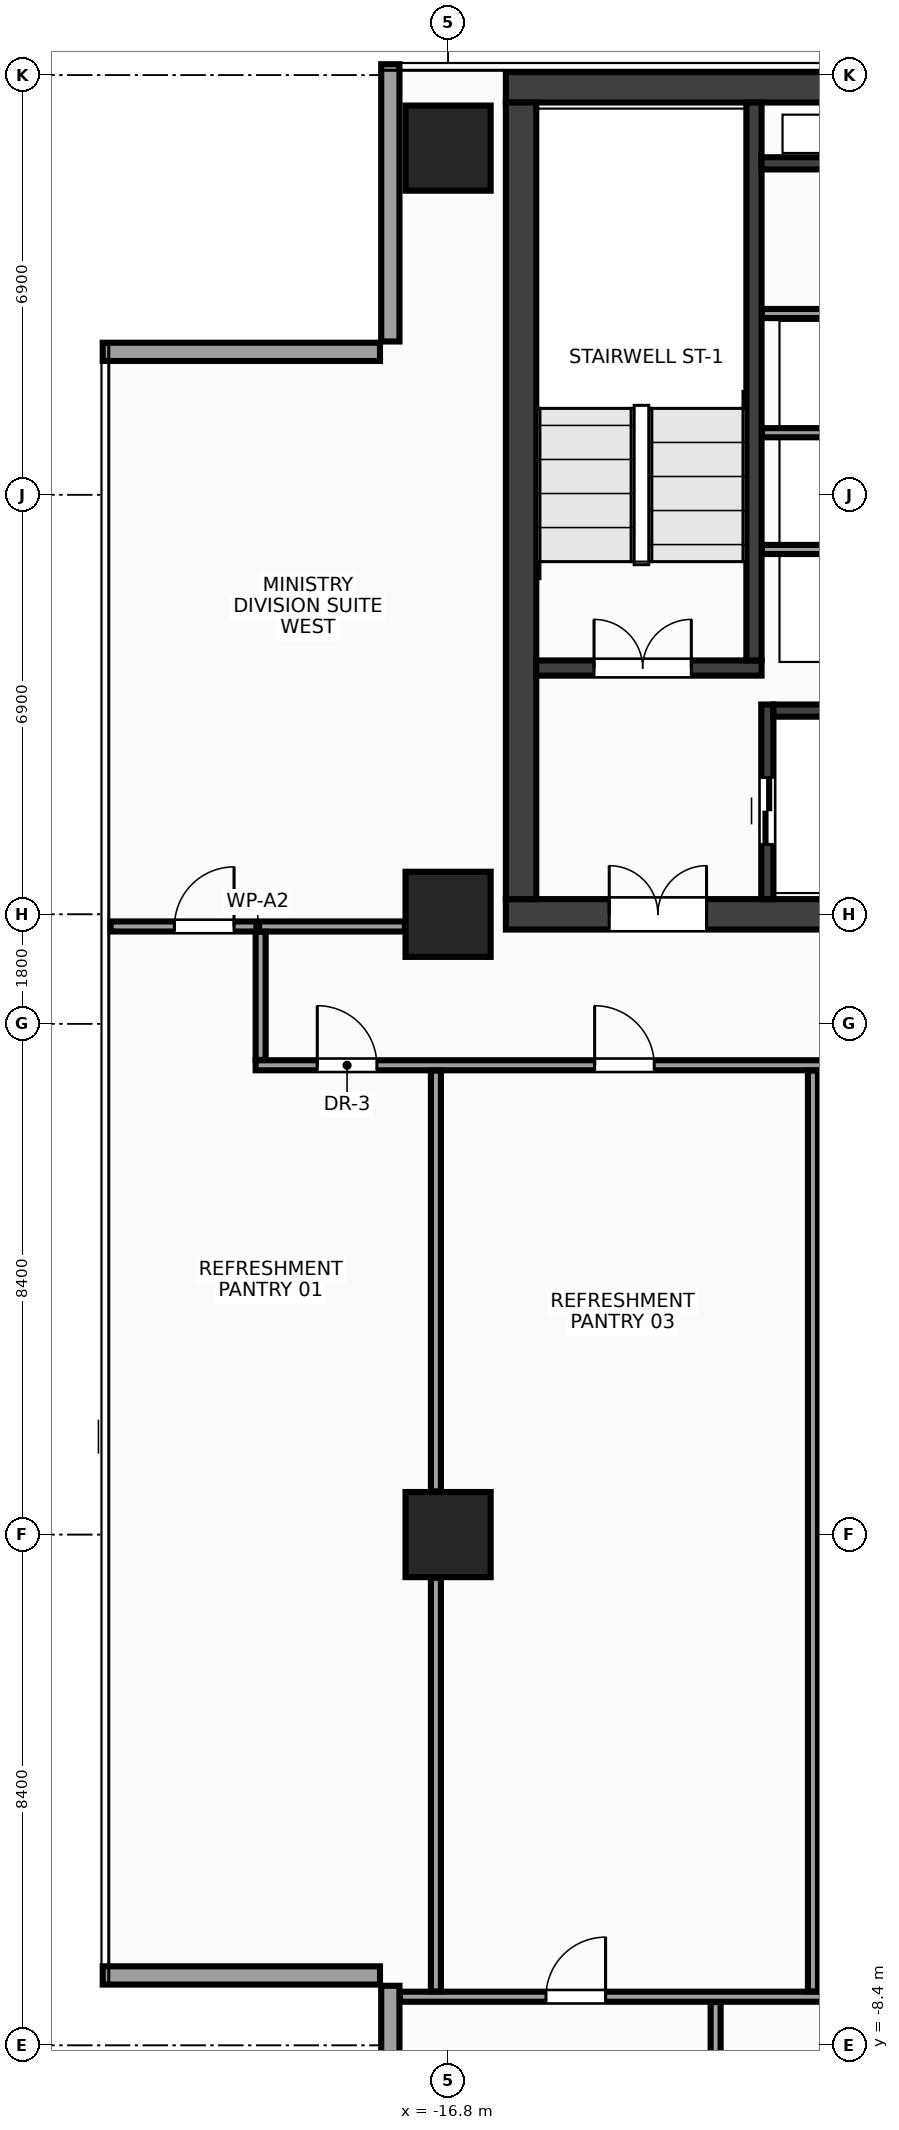
"""IFC4 building model, lengths in metres.
Left out: names, types, materials, properties, quantities, classifications, styles, units other than length and angle.
Written with IfcOpenShell. Run it as: python <this file> out.ifc"""

import sys

from ifc_helpers import new_model, si_unit, direction, frame, frame_2d, origin, origin_2d, place, context, subcontext, project, spatial, rectangle, extrude, source, transform, mapped, element, fill, save


model = new_model("IFC4")
c1 = context("Model", 3, precision=1e-05, world=origin(), true_north=direction((0.0, 1.0)))
c2 = subcontext(c1, "Body", "Model", "MODEL_VIEW")
j1 = project(units=[si_unit("LENGTHUNIT", "METRE"), si_unit("PLANEANGLEUNIT", "RADIAN")], contexts=[c1])
p1 = place(None, origin())
s1 = spatial("IfcSite", under=j1, at=p1, CompositionType="ELEMENT")
p2 = place(p1, origin())
s2 = spatial("IfcBuilding", under=s1, at=p2, CompositionType="ELEMENT")
p3 = place(p2, frame((0.0, 0.0, 254.0)))
s3 = spatial("IfcBuildingStorey", under=s2, at=p3, CompositionType="ELEMENT", Elevation=254.0)
m1 = source(origin(), c2, "Body", "SweptSolid", [
    extrude(rectangle(XDim=31.7, YDim=0.5, at=frame_2d((15.85, 0.0))), origin(), (0.0, 0.0, 1.0), 3.6),
])
p4 = place(p3, frame((-15.85, 23.8, 0.0), z_axis=(0.0, 0.0, 1.0), x_axis=(1.0, 0.0, 0.0)))
e1 = element("IfcWall", 1, at=p4, inside=s3, PredefinedType="SHEAR", context=c2, shape_type="MappedRepresentation", body=[
    mapped(m1, transform((0.0, 0.0, 0.0), x_axis=(1.0, 0.0, 0.0), y_axis=(0.0, 1.0, 0.0), z_axis=(0.0, 0.0, 1.0), scale=1.0)),
])
p5 = place(p3, frame((-15.85, 10.2, 0.0), z_axis=(0.0, 0.0, 1.0), x_axis=(1.0, 0.0, 0.0)))
e2 = element("IfcWall", 2, at=p5, inside=s3, PredefinedType="SHEAR", context=c2, shape_type="MappedRepresentation", body=[
    mapped(m1, transform((0.0, 0.0, 0.0), x_axis=(1.0, 0.0, 0.0), y_axis=(0.0, 1.0, 0.0), z_axis=(0.0, 0.0, 1.0), scale=1.0)),
])
p6 = place(p5, frame((1.7, 0.0, 0.0)))
e3 = element("IfcOpeningElement", 3, at=p6, cuts=e2, PredefinedType="OPENING", context=c2, shape_type="SweptSolid", body=[
    extrude(rectangle(XDim=1.6, YDim=2.15, at=frame_2d((0.8, 1.075))), frame((0.0, 0.262, 0.0), z_axis=(0.0, -1.0, 0.0), x_axis=(1.0, 0.0, 0.0)), (0.0, 0.0, 1.0), 0.524),
])
p7 = place(p5, frame((28.4, 0.0, 0.0)))
e4 = element("IfcOpeningElement", 4, at=p7, cuts=e2, PredefinedType="OPENING", context=c2, shape_type="SweptSolid", body=[
    extrude(rectangle(XDim=1.6, YDim=2.15, at=frame_2d((0.8, 1.075))), frame((0.0, 0.262, 0.0), z_axis=(0.0, -1.0, 0.0), x_axis=(1.0, 0.0, 0.0)), (0.0, 0.0, 1.0), 0.524),
])
p8 = place(p5, frame((15.1, 0.0, 0.0)))
e5 = element("IfcOpeningElement", 5, at=p8, cuts=e2, PredefinedType="OPENING", context=c2, shape_type="SweptSolid", body=[
    extrude(rectangle(XDim=1.5, YDim=2.2, at=frame_2d((0.75, 1.1))), frame((0.0, 0.262, 0.0), z_axis=(0.0, -1.0, 0.0), x_axis=(1.0, 0.0, 0.0)), (0.0, 0.0, 1.0), 0.524),
])
m2 = source(origin(), c2, "Body", "SweptSolid", [
    extrude(rectangle(XDim=13.1, YDim=0.5, at=frame_2d((6.55, 0.0))), origin(), (0.0, 0.0, 1.0), 3.6),
])
p9 = place(p3, frame((-15.6, 10.45, 0.0), z_axis=(0.0, 0.0, 1.0), x_axis=(0.0, 1.0, 0.0)))
e6 = element("IfcWall", 6, at=p9, inside=s3, PredefinedType="SHEAR", context=c2, shape_type="MappedRepresentation", body=[
    mapped(m2, transform((0.0, 0.0, 0.0), x_axis=(1.0, 0.0, 0.0), y_axis=(0.0, 1.0, 0.0), z_axis=(0.0, 0.0, 1.0), scale=1.0)),
])
m3 = source(origin(), c2, "Body", "SweptSolid", [
    extrude(rectangle(XDim=3.705, YDim=0.25, at=frame_2d((1.853, 0.0))), origin(), (0.0, 0.0, 1.0), 3.6),
])
p10 = place(p3, frame((-15.35, 14.25, 0.0), z_axis=(0.0, 0.0, 1.0), x_axis=(1.0, 0.0, 0.0)))
e7 = element("IfcWall", 7, at=p10, inside=s3, PredefinedType="SHEAR", context=c2, shape_type="MappedRepresentation", body=[
    mapped(m3, transform((0.0, 0.0, 0.0), x_axis=(1.0, 0.0, 0.0), y_axis=(0.0, 1.0, 0.0), z_axis=(0.0, 0.0, 1.0), scale=1.0)),
])
p11 = place(p10, frame((0.95, 0.0, 0.0)))
e8 = element("IfcOpeningElement", 8, at=p11, cuts=e7, PredefinedType="OPENING", context=c2, shape_type="SweptSolid", body=[
    extrude(rectangle(XDim=1.6, YDim=2.15, at=frame_2d((0.8, 1.075))), frame((0.0, 0.137, 0.0), z_axis=(0.0, -1.0, 0.0), x_axis=(1.0, 0.0, 0.0)), (0.0, 0.0, 1.0), 0.274),
])
m4 = source(origin(), c2, "Body", "SweptSolid", [
    extrude(rectangle(XDim=9.175, YDim=0.25, at=frame_2d((4.587, 0.0))), origin(), (0.0, 0.0, 1.0), 3.6),
])
p12 = place(p3, frame((-11.77, 14.375, 0.0), z_axis=(0.0, 0.0, 1.0), x_axis=(0.0, 1.0, 0.0)))
e9 = element("IfcWall", 9, at=p12, inside=s3, PredefinedType="SHEAR", context=c2, shape_type="MappedRepresentation", body=[
    mapped(m4, transform((0.0, 0.0, 0.0), x_axis=(1.0, 0.0, 0.0), y_axis=(0.0, 1.0, 0.0), z_axis=(0.0, 0.0, 1.0), scale=1.0)),
])
m5 = source(origin(), c2, "Body", "SweptSolid", [
    extrude(rectangle(XDim=3.2, YDim=0.2, at=frame_2d((1.6, 0.0))), origin(), (0.0, 0.0, 1.0), 3.6),
])
p13 = place(p3, frame((-11.55, 10.45, 0.0), z_axis=(0.0, 0.0, 1.0), x_axis=(0.0, 1.0, 0.0)))
e10 = element("IfcWall", 10, at=p13, inside=s3, PredefinedType="SHEAR", context=c2, shape_type="MappedRepresentation", body=[
    mapped(m5, transform((0.0, 0.0, 0.0), x_axis=(1.0, 0.0, 0.0), y_axis=(0.0, 1.0, 0.0), z_axis=(0.0, 0.0, 1.0), scale=1.0)),
])
p14 = place(p13, frame((0.9, 0.0, 0.0)))
e11 = element("IfcOpeningElement", 11, at=p14, cuts=e10, PredefinedType="OPENING", context=c2, shape_type="SweptSolid", body=[
    extrude(rectangle(XDim=1.1, YDim=2.15, at=frame_2d((0.55, 1.075))), frame((0.0, 0.112, 0.0), z_axis=(0.0, -1.0, 0.0), x_axis=(1.0, 0.0, 0.0)), (0.0, 0.0, 1.0), 0.224),
])
m6 = source(origin(), c2, "Body", "SweptSolid", [
    extrude(rectangle(XDim=2.825, YDim=0.2, at=frame_2d((1.413, 0.0))), origin(), (0.0, 0.0, 1.0), 3.6),
])
p15 = place(p3, frame((-11.45, 13.55, 0.0), z_axis=(0.0, 0.0, 1.0), x_axis=(1.0, 0.0, 0.0)))
e12 = element("IfcWall", 12, at=p15, inside=s3, PredefinedType="SHEAR", context=c2, shape_type="MappedRepresentation", body=[
    mapped(m6, transform((0.0, 0.0, 0.0), x_axis=(1.0, 0.0, 0.0), y_axis=(0.0, 1.0, 0.0), z_axis=(0.0, 0.0, 1.0), scale=1.0)),
])
m7 = source(origin(), c2, "Body", "SweptSolid", [
    extrude(rectangle(XDim=3.02, YDim=0.2, at=frame_2d((1.51, 0.0))), origin(), (0.0, 0.0, 1.0), 3.6),
])
p16 = place(p3, frame((-11.645, 22.55, 0.0), z_axis=(0.0, 0.0, 1.0), x_axis=(1.0, 0.0, 0.0)))
e13 = element("IfcWall", 13, at=p16, inside=s3, PredefinedType="SHEAR", context=c2, shape_type="MappedRepresentation", body=[
    mapped(m7, transform((0.0, 0.0, 0.0), x_axis=(1.0, 0.0, 0.0), y_axis=(0.0, 1.0, 0.0), z_axis=(0.0, 0.0, 1.0), scale=1.0)),
])
m8 = source(origin(), c2, "Body", "SweptSolid", [
    extrude(rectangle(XDim=1.4, YDim=1.4, at=origin_2d()), origin(), (0.0, 0.0, 1.0), 3.6),
])
for number, where, z_axis, x_axis in (
    (14, (-16.8, 0.0, 0.0), (0.0, 0.0, 1.0), (1.0, 0.0, 0.0)),
    (15, (-16.8, 10.2, 0.0), (0.0, 0.0, 1.0), (1.0, 0.0, 0.0)),
    (16, (-16.8, 22.8, 0.0), (0.0, 0.0, 1.0), (1.0, 0.0, 0.0)),
):
    element("IfcColumn", number, at=place(p3, frame(where, z_axis=z_axis, x_axis=x_axis)), inside=s3, PredefinedType="COLUMN", context=c2, shape_type="MappedRepresentation", body=[
        mapped(m8, transform((0.0, 0.0, 0.0), x_axis=(1.0, 0.0, 0.0), y_axis=(0.0, 1.0, 0.0), z_axis=(0.0, 0.0, 1.0), scale=1.0)),
    ])
m9 = source(origin(), c2, "Body", "SweptSolid", [
    extrude(rectangle(XDim=4.56, YDim=0.3, at=frame_2d((2.28, 0.0))), origin(), (0.0, 0.0, 1.0), 2.75),
])
p17 = place(p3, frame((-17.75, 24.18, 0.0), z_axis=(0.0, 0.0, 1.0), x_axis=(0.0, -1.0, 0.0)))
e17 = element("IfcWall", 17, at=p17, inside=s3, PredefinedType="STANDARD", context=c2, shape_type="MappedRepresentation", body=[
    mapped(m9, transform((0.0, 0.0, 0.0), x_axis=(1.0, 0.0, 0.0), y_axis=(0.0, 1.0, 0.0), z_axis=(0.0, 0.0, 1.0), scale=1.0)),
])
m10 = source(origin(), c2, "Body", "SweptSolid", [
    extrude(rectangle(XDim=4.56, YDim=0.3, at=frame_2d((2.28, 0.0))), origin(), (0.0, 0.0, 1.0), 2.75),
])
for number, where, z_axis, x_axis in (
    (18, (-17.92, 19.45, 0.0), (0.0, 0.0, 1.0), (-1.0, 0.0, 0.0)),
    (19, (-22.48, -7.25, 0.0), (0.0, 0.0, 1.0), (1.0, 0.0, 0.0)),
    (20, (-17.75, -7.42, 0.0), (0.0, 0.0, 1.0), (0.0, -1.0, 0.0)),
):
    element("IfcWall", number, at=place(p3, frame(where, z_axis=z_axis, x_axis=x_axis)), inside=s3, PredefinedType="STANDARD", context=c2, shape_type="MappedRepresentation", body=[
        mapped(m10, transform((0.0, 0.0, 0.0), x_axis=(1.0, 0.0, 0.0), y_axis=(0.0, 1.0, 0.0), z_axis=(0.0, 0.0, 1.0), scale=1.0)),
    ])
m11 = source(origin(), c2, "Body", "SweptSolid", [
    extrude(rectangle(XDim=3.01, YDim=0.15, at=frame_2d((1.505, 0.0))), origin(), (0.0, 0.0, 1.0), 3.37),
])
for number, where, z_axis, x_axis in (
    (21, (-11.64, 16.2, 0.0), (0.0, 0.0, 1.0), (1.0, 0.0, 0.0)),
    (22, (-11.64, 18.12, 0.0), (0.0, 0.0, 1.0), (1.0, 0.0, 0.0)),
    (23, (-11.64, 20.08, 0.0), (0.0, 0.0, 1.0), (1.0, 0.0, 0.0)),
):
    element("IfcWall", number, at=place(p3, frame(where, z_axis=z_axis, x_axis=x_axis)), inside=s3, PredefinedType="PARTITIONING", context=c2, shape_type="MappedRepresentation", body=[
        mapped(m11, transform((0.0, 0.0, 0.0), x_axis=(1.0, 0.0, 0.0), y_axis=(0.0, 1.0, 0.0), z_axis=(0.0, 0.0, 1.0), scale=1.0)),
    ])
m12 = source(origin(), c2, "Body", "SweptSolid", [
    extrude(rectangle(XDim=4.84, YDim=0.165, at=frame_2d((2.42, 0.0))), origin(), (0.0, 0.0, 1.0), 3.37),
])
p18 = place(p3, frame((-22.35, 10.0, 0.0), z_axis=(0.0, 0.0, 1.0), x_axis=(1.0, 0.0, 0.0)))
e24 = element("IfcWall", 24, at=p18, inside=s3, PredefinedType="PARTITIONING", context=c2, shape_type="MappedRepresentation", body=[
    mapped(m12, transform((0.0, 0.0, 0.0), x_axis=(1.0, 0.0, 0.0), y_axis=(0.0, 1.0, 0.0), z_axis=(0.0, 0.0, 1.0), scale=1.0)),
])
p19 = place(p18, frame((1.05, 0.0, 0.0)))
e25 = element("IfcOpeningElement", 25, at=p19, cuts=e24, PredefinedType="OPENING", context=c2, shape_type="SweptSolid", body=[
    extrude(rectangle(XDim=0.98, YDim=2.15, at=frame_2d((0.49, 1.075))), frame((0.0, 0.094, 0.0), z_axis=(0.0, -1.0, 0.0), x_axis=(1.0, 0.0, 0.0)), (0.0, 0.0, 1.0), 0.189),
])
m13 = source(origin(), c2, "Body", "SweptSolid", [
    extrude(rectangle(XDim=15.6, YDim=0.165, at=frame_2d((7.8, 0.0))), origin(), (0.0, 0.0, 1.0), 2.755),
])
p20 = place(p3, frame((-19.965, 7.718, 0.0), z_axis=(0.0, 0.0, 1.0), x_axis=(1.0, 0.0, 0.0)))
e26 = element("IfcWall", 26, at=p20, inside=s3, PredefinedType="PARTITIONING", context=c2, shape_type="MappedRepresentation", body=[
    mapped(m13, transform((0.0, 0.0, 0.0), x_axis=(1.0, 0.0, 0.0), y_axis=(0.0, 1.0, 0.0), z_axis=(0.0, 0.0, 1.0), scale=1.0)),
])
p21 = place(p20, frame((1.014, 0.0, 0.0)))
e27 = element("IfcOpeningElement", 27, at=p21, cuts=e26, PredefinedType="OPENING", context=c2, shape_type="SweptSolid", body=[
    extrude(rectangle(XDim=0.98, YDim=2.15, at=frame_2d((0.49, 1.075))), frame((0.0, 0.094, 0.0), z_axis=(0.0, -1.0, 0.0), x_axis=(1.0, 0.0, 0.0)), (0.0, 0.0, 1.0), 0.189),
])
p22 = place(p20, frame((5.575, 0.0, 0.0)))
e28 = element("IfcOpeningElement", 28, at=p22, cuts=e26, PredefinedType="OPENING", context=c2, shape_type="SweptSolid", body=[
    extrude(rectangle(XDim=0.98, YDim=2.15, at=frame_2d((0.49, 1.075))), frame((0.0, 0.094, 0.0), z_axis=(0.0, -1.0, 0.0), x_axis=(1.0, 0.0, 0.0)), (0.0, 0.0, 1.0), 0.189),
])
p23 = place(p20, frame((11.874, 0.0, 0.0)))
e29 = element("IfcOpeningElement", 29, at=p23, cuts=e26, PredefinedType="OPENING", context=c2, shape_type="SweptSolid", body=[
    extrude(rectangle(XDim=0.98, YDim=2.15, at=frame_2d((0.49, 1.075))), frame((0.0, 0.094, 0.0), z_axis=(0.0, -1.0, 0.0), x_axis=(1.0, 0.0, 0.0)), (0.0, 0.0, 1.0), 0.189),
])
m14 = source(origin(), c2, "Body", "SweptSolid", [
    extrude(rectangle(XDim=2.108, YDim=0.165, at=frame_2d((1.054, 0.0))), origin(), (0.0, 0.0, 1.0), 3.37),
])
p24 = place(p3, frame((-19.883, 7.805, 0.0), z_axis=(0.0, 0.0, 1.0), x_axis=(0.0, 1.0, 0.0)))
e30 = element("IfcWall", 30, at=p24, inside=s3, PredefinedType="PARTITIONING", context=c2, shape_type="MappedRepresentation", body=[
    mapped(m14, transform((0.0, 0.0, 0.0), x_axis=(1.0, 0.0, 0.0), y_axis=(0.0, 1.0, 0.0), z_axis=(0.0, 0.0, 1.0), scale=1.0)),
])
m15 = source(origin(), c2, "Body", "SweptSolid", [
    extrude(rectangle(XDim=35.184, YDim=0.165, at=frame_2d((17.592, 0.0))), origin(), (0.0, 0.0, 1.0), 2.755),
])
p25 = place(p3, frame((-17.592, -7.6, 0.0), z_axis=(0.0, 0.0, 1.0), x_axis=(1.0, 0.0, 0.0)))
e31 = element("IfcWall", 31, at=p25, inside=s3, PredefinedType="PARTITIONING", context=c2, shape_type="MappedRepresentation", body=[
    mapped(m15, transform((0.0, 0.0, 0.0), x_axis=(1.0, 0.0, 0.0), y_axis=(0.0, 1.0, 0.0), z_axis=(0.0, 0.0, 1.0), scale=1.0)),
])
p26 = place(p25, frame((2.402, 0.0, 0.0)))
e32 = element("IfcOpeningElement", 32, at=p26, cuts=e31, PredefinedType="OPENING", context=c2, shape_type="SweptSolid", body=[
    extrude(rectangle(XDim=0.98, YDim=2.15, at=frame_2d((0.49, 1.075))), frame((0.0, 0.094, 0.0), z_axis=(0.0, -1.0, 0.0), x_axis=(1.0, 0.0, 0.0)), (0.0, 0.0, 1.0), 0.189),
])
p27 = place(p25, frame((31.702, 0.0, 0.0)))
e33 = element("IfcOpeningElement", 33, at=p27, cuts=e31, PredefinedType="OPENING", context=c2, shape_type="SweptSolid", body=[
    extrude(rectangle(XDim=0.98, YDim=2.15, at=frame_2d((0.49, 1.075))), frame((0.0, 0.094, 0.0), z_axis=(0.0, -1.0, 0.0), x_axis=(1.0, 0.0, 0.0)), (0.0, 0.0, 1.0), 0.189),
])
p28 = place(p25, frame((9.102, 0.0, 0.0)))
e34 = element("IfcOpeningElement", 34, at=p28, cuts=e31, PredefinedType="OPENING", context=c2, shape_type="SweptSolid", body=[
    extrude(rectangle(XDim=0.98, YDim=2.15, at=frame_2d((0.49, 1.075))), frame((0.0, 0.094, 0.0), z_axis=(0.0, -1.0, 0.0), x_axis=(1.0, 0.0, 0.0)), (0.0, 0.0, 1.0), 0.189),
])
p29 = place(p25, frame((16.302, 0.0, 0.0)))
e35 = element("IfcOpeningElement", 35, at=p29, cuts=e31, PredefinedType="OPENING", context=c2, shape_type="SweptSolid", body=[
    extrude(rectangle(XDim=0.98, YDim=2.15, at=frame_2d((0.49, 1.075))), frame((0.0, 0.094, 0.0), z_axis=(0.0, -1.0, 0.0), x_axis=(1.0, 0.0, 0.0)), (0.0, 0.0, 1.0), 0.189),
])
p30 = place(p25, frame((24.302, 0.0, 0.0)))
e36 = element("IfcOpeningElement", 36, at=p30, cuts=e31, PredefinedType="OPENING", context=c2, shape_type="SweptSolid", body=[
    extrude(rectangle(XDim=0.98, YDim=2.15, at=frame_2d((0.49, 1.075))), frame((0.0, 0.094, 0.0), z_axis=(0.0, -1.0, 0.0), x_axis=(1.0, 0.0, 0.0)), (0.0, 0.0, 1.0), 0.189),
])
m16 = source(origin(), c2, "Body", "SweptSolid", [
    extrude(rectangle(XDim=6.802, YDim=0.165, at=frame_2d((3.401, 0.0))), origin(), (0.0, 0.0, 1.0), 2.755),
])
p31 = place(p3, frame((-17.0, -7.512, 0.0), z_axis=(0.0, 0.0, 1.0), x_axis=(0.0, 1.0, 0.0)))
e37 = element("IfcWall", 37, at=p31, inside=s3, PredefinedType="PARTITIONING", context=c2, shape_type="MappedRepresentation", body=[
    mapped(m16, transform((0.0, 0.0, 0.0), x_axis=(1.0, 0.0, 0.0), y_axis=(0.0, 1.0, 0.0), z_axis=(0.0, 0.0, 1.0), scale=1.0)),
])
m17 = source(origin(), c2, "Body", "SweptSolid", [
    extrude(rectangle(XDim=6.92, YDim=0.165, at=frame_2d((3.46, 0.0))), origin(), (0.0, 0.0, 1.0), 2.755),
])
p32 = place(p3, frame((-17.0, 0.71, 0.0), z_axis=(0.0, 0.0, 1.0), x_axis=(0.0, 1.0, 0.0)))
e38 = element("IfcWall", 38, at=p32, inside=s3, PredefinedType="PARTITIONING", context=c2, shape_type="MappedRepresentation", body=[
    mapped(m17, transform((0.0, 0.0, 0.0), x_axis=(1.0, 0.0, 0.0), y_axis=(0.0, 1.0, 0.0), z_axis=(0.0, 0.0, 1.0), scale=1.0)),
])
m18 = source(origin(), c2, "Body", "SweptSolid", [
    extrude(rectangle(XDim=15.142, YDim=0.165, at=frame_2d((7.571, 0.0))), origin(), (0.0, 0.0, 1.0), 2.655),
])
p33 = place(p3, frame((-10.8, -7.512, 0.0), z_axis=(0.0, 0.0, 1.0), x_axis=(0.0, 1.0, 0.0)))
e39 = element("IfcWall", 39, at=p33, inside=s3, PredefinedType="PARTITIONING", context=c2, shape_type="MappedRepresentation", body=[
    mapped(m18, transform((0.0, 0.0, 0.0), x_axis=(1.0, 0.0, 0.0), y_axis=(0.0, 1.0, 0.0), z_axis=(0.0, 0.0, 1.0), scale=1.0)),
])
m19 = source(origin(), c2, "Body", "SweptSolid", [
    extrude(rectangle(XDim=4.163, YDim=0.165, at=frame_2d((2.081, 0.0))), origin(), (0.0, 0.0, 1.0), 2.905),
])
p34 = place(p3, frame((-12.4, -11.85, 0.0), z_axis=(0.0, 0.0, 1.0), x_axis=(0.0, 1.0, 0.0)))
e40 = element("IfcWall", 40, at=p34, inside=s3, PredefinedType="PARTITIONING", context=c2, shape_type="MappedRepresentation", body=[
    mapped(m19, transform((0.0, 0.0, 0.0), x_axis=(1.0, 0.0, 0.0), y_axis=(0.0, 1.0, 0.0), z_axis=(0.0, 0.0, 1.0), scale=1.0)),
])
m20 = source(origin(), c2, "Body", "SweptSolid", [
    extrude(rectangle(XDim=1.6, YDim=2.15, at=frame_2d((0.8, 1.075))), frame((0.0, 0.025, 0.0), z_axis=(0.0, -1.0, 0.0), x_axis=(1.0, 0.0, 0.0)), (0.0, 0.0, 1.0), 0.05),
])
p35 = place(p11, origin())
e41 = element("IfcDoor", 41, at=p35, inside=s3, OperationType="DOUBLE_DOOR_SINGLE_SWING", PredefinedType="DOOR", context=c2, shape_type="MappedRepresentation", body=[
    mapped(m20, transform((0.0, 0.0, 0.0), x_axis=(1.0, 0.0, 0.0), y_axis=(0.0, 1.0, 0.0), z_axis=(0.0, 0.0, 1.0), scale=1.0)),
])
fill(e8, e41)
p36 = place(p6, origin())
e42 = element("IfcDoor", 42, at=p36, inside=s3, OperationType="DOUBLE_DOOR_SINGLE_SWING", PredefinedType="DOOR", context=c2, shape_type="MappedRepresentation", body=[
    mapped(m20, transform((0.0, 0.0, 0.0), x_axis=(1.0, 0.0, 0.0), y_axis=(0.0, 1.0, 0.0), z_axis=(0.0, 0.0, 1.0), scale=1.0)),
])
fill(e3, e42)
m21 = source(origin(), c2, "Body", "SweptSolid", [
    extrude(rectangle(XDim=1.1, YDim=2.15, at=frame_2d((0.55, 1.075))), frame((0.0, 0.025, 0.0), z_axis=(0.0, -1.0, 0.0), x_axis=(1.0, 0.0, 0.0)), (0.0, 0.0, 1.0), 0.05),
])
p37 = place(p14, origin())
e43 = element("IfcDoor", 43, at=p37, inside=s3, OperationType="DOUBLE_DOOR_SLIDING", PredefinedType="DOOR", context=c2, shape_type="MappedRepresentation", body=[
    mapped(m21, transform((0.0, 0.0, 0.0), x_axis=(1.0, 0.0, 0.0), y_axis=(0.0, 1.0, 0.0), z_axis=(0.0, 0.0, 1.0), scale=1.0)),
])
fill(e11, e43)
m22 = source(origin(), c2, "Body", "SweptSolid", [
    extrude(rectangle(XDim=0.98, YDim=2.15, at=frame_2d((0.49, 1.075))), frame((0.0, 0.025, 0.0), z_axis=(0.0, -1.0, 0.0), x_axis=(1.0, 0.0, 0.0)), (0.0, 0.0, 1.0), 0.05),
])
p38 = place(p21, origin())
e44 = element("IfcDoor", 44, at=p38, inside=s3, OperationType="SINGLE_SWING_LEFT", PredefinedType="DOOR", context=c2, shape_type="MappedRepresentation", body=[
    mapped(m22, transform((0.0, 0.0, 0.0), x_axis=(1.0, 0.0, 0.0), y_axis=(0.0, 1.0, 0.0), z_axis=(0.0, 0.0, 1.0), scale=1.0)),
])
fill(e27, e44)
p39 = place(p22, origin())
e45 = element("IfcDoor", 45, at=p39, inside=s3, OperationType="SINGLE_SWING_LEFT", PredefinedType="DOOR", context=c2, shape_type="MappedRepresentation", body=[
    mapped(m22, transform((0.0, 0.0, 0.0), x_axis=(1.0, 0.0, 0.0), y_axis=(0.0, 1.0, 0.0), z_axis=(0.0, 0.0, 1.0), scale=1.0)),
])
fill(e28, e45)
p40 = place(p19, origin())
e46 = element("IfcDoor", 46, at=p40, inside=s3, OperationType="SINGLE_SWING_RIGHT", PredefinedType="DOOR", context=c2, shape_type="MappedRepresentation", body=[
    mapped(m22, transform((0.0, 0.0, 0.0), x_axis=(1.0, 0.0, 0.0), y_axis=(0.0, 1.0, 0.0), z_axis=(0.0, 0.0, 1.0), scale=1.0)),
])
fill(e25, e46)
p41 = place(p26, origin())
e47 = element("IfcDoor", 47, at=p41, inside=s3, OperationType="SINGLE_SWING_RIGHT", PredefinedType="DOOR", context=c2, shape_type="MappedRepresentation", body=[
    mapped(m22, transform((0.0, 0.0, 0.0), x_axis=(1.0, 0.0, 0.0), y_axis=(0.0, 1.0, 0.0), z_axis=(0.0, 0.0, 1.0), scale=1.0)),
])
fill(e32, e47)
save(model, sys.argv[1])
